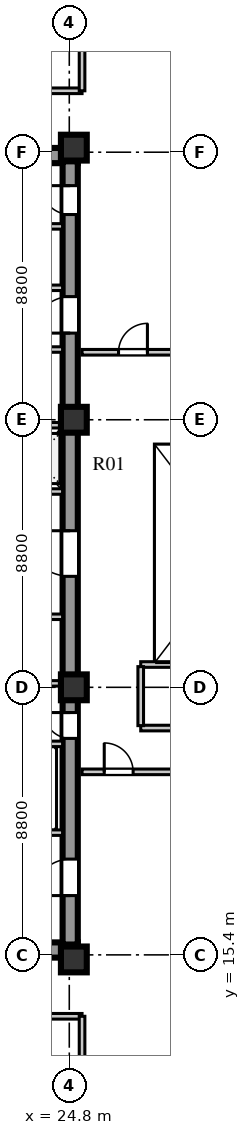
"""IFC4 building model, lengths in metres.
Left out: names, types, materials, properties, quantities, classifications, styles, units other than length and angle.
Written with IfcOpenShell. Run it as: python <this file> out.ifc"""

import sys

from ifc_helpers import new_model, si_unit, direction, frame, frame_2d, origin, origin_2d, place, context, subcontext, project, spatial, rectangle, extrude, element, fill, save


model = new_model("IFC4")
c1 = context("Model", 3, precision=1e-05, world=origin(), true_north=direction((0.0, 1.0)))
c2 = subcontext(c1, "Body", "Model", "MODEL_VIEW")
j1 = project(units=[si_unit("LENGTHUNIT", "METRE"), si_unit("PLANEANGLEUNIT", "RADIAN")], contexts=[c1])
p1 = place(None, origin())
s1 = spatial("IfcSite", under=j1, at=p1, CompositionType="ELEMENT")
p2 = place(p1, origin())
s2 = spatial("IfcBuilding", under=s1, at=p2, CompositionType="ELEMENT")
p3 = place(p2, frame((0.0, 0.0, 150.2)))
s3 = spatial("IfcBuildingStorey", under=s2, at=p3, CompositionType="ELEMENT", Elevation=150.2)
for number, where, z_axis, x_axis in (
    (1, (15.4, 15.56, 0.0), (0.0, 0.0, 1.0), (1.0, 0.0, 0.0)),
    (2, (15.4, 41.69, 0.0), (0.0, 0.0, 1.0), (1.0, 0.0, 0.0)),
):
    element("IfcWall", number, at=place(p3, frame(where, z_axis=z_axis, x_axis=x_axis)), inside=s3, PredefinedType="SHEAR", context=c2, shape_type="SweptSolid", body=[
        extrude(rectangle(XDim=9.68, YDim=0.5, at=frame_2d((4.84, 0.0))), origin(), (0.0, 0.0, 1.0), 3.55),
    ])
p4 = place(p3, frame((24.83, 15.74, 0.0), z_axis=(0.0, 0.0, 1.0), x_axis=(0.0, 1.0, 0.0)))
e3 = element("IfcWall", 3, at=p4, inside=s3, PredefinedType="SHEAR", context=c2, shape_type="SweptSolid", body=[
    extrude(rectangle(XDim=25.76, YDim=0.5, at=frame_2d((12.88, 0.0))), origin(), (0.0, 0.0, 1.0), 3.55),
])
p5 = place(p4, frame((1.61, 0.0, 0.0)))
e4 = element("IfcOpeningElement", 4, at=p5, cuts=e3, PredefinedType="OPENING", context=c2, shape_type="SweptSolid", body=[
    extrude(rectangle(XDim=1.2, YDim=2.1, at=frame_2d((0.6, 1.05))), frame((0.0, 0.26, 0.0), z_axis=(0.0, -1.0, 0.0), x_axis=(1.0, 0.0, 0.0)), (0.0, 0.0, 1.0), 0.52),
])
p6 = place(p4, frame((6.78, 0.0, 0.0)))
e5 = element("IfcOpeningElement", 5, at=p6, cuts=e3, PredefinedType="OPENING", context=c2, shape_type="SweptSolid", body=[
    extrude(rectangle(XDim=0.85, YDim=2.06, at=frame_2d((0.425, 1.03))), frame((0.0, 0.26, 0.0), z_axis=(0.0, -1.0, 0.0), x_axis=(1.0, 0.0, 0.0)), (0.0, 0.0, 1.0), 0.52),
])
p7 = place(p4, frame((12.11, 0.0, 0.0)))
e6 = element("IfcOpeningElement", 6, at=p7, cuts=e3, PredefinedType="OPENING", context=c2, shape_type="SweptSolid", body=[
    extrude(rectangle(XDim=1.5, YDim=2.12, at=frame_2d((0.75, 1.06))), frame((0.0, 0.26, 0.0), z_axis=(0.0, -1.0, 0.0), x_axis=(1.0, 0.0, 0.0)), (0.0, 0.0, 1.0), 0.52),
])
p8 = place(p4, frame((20.11, 0.0, 0.0)))
e7 = element("IfcOpeningElement", 7, at=p8, cuts=e3, PredefinedType="OPENING", context=c2, shape_type="SweptSolid", body=[
    extrude(rectangle(XDim=1.2, YDim=2.12, at=frame_2d((0.6, 1.06))), frame((0.0, 0.26, 0.0), z_axis=(0.0, -1.0, 0.0), x_axis=(1.0, 0.0, 0.0)), (0.0, 0.0, 1.0), 0.52),
])
p9 = place(p4, frame((24.01, 0.0, 0.0)))
e8 = element("IfcOpeningElement", 8, at=p9, cuts=e3, PredefinedType="OPENING", context=c2, shape_type="SweptSolid", body=[
    extrude(rectangle(XDim=0.95, YDim=2.1, at=frame_2d((0.475, 1.05))), frame((0.0, 0.26, 0.0), z_axis=(0.0, -1.0, 0.0), x_axis=(1.0, 0.0, 0.0)), (0.0, 0.0, 1.0), 0.52),
])
for number, where, z_axis, x_axis in (
    (9, (24.95, 15.25, 0.0), (0.0, 0.0, 1.0), (1.0, 0.0, 0.0)),
    (10, (24.95, 24.2, 0.0), (0.0, 0.0, 1.0), (1.0, 0.0, 0.0)),
    (11, (24.95, 33.0, 0.0), (0.0, 0.0, 1.0), (1.0, 0.0, 0.0)),
    (12, (24.95, 41.95, 0.0), (0.0, 0.0, 1.0), (1.0, 0.0, 0.0)),
):
    element("IfcColumn", number, at=place(p3, frame(where, z_axis=z_axis, x_axis=x_axis)), inside=s3, PredefinedType="COLUMN", context=c2, shape_type="SweptSolid", body=[
        extrude(rectangle(XDim=0.85, YDim=0.85, at=origin_2d()), origin(), (0.0, 0.0, 1.0), 3.55),
    ])
p10 = place(p3, frame((19.64, 19.42, 0.0), z_axis=(0.0, 0.0, 1.0), x_axis=(1.0, 0.0, 0.0)))
e13 = element("IfcWall", 13, at=p10, inside=s3, PredefinedType="SOLIDWALL", context=c2, shape_type="SweptSolid", body=[
    extrude(rectangle(XDim=4.94, YDim=0.18, at=frame_2d((2.47, 0.0))), origin(), (0.0, 0.0, 1.0), 3.55),
])
p11 = place(p10, frame((0.72, 0.0, 0.0)))
e14 = element("IfcOpeningElement", 14, at=p11, cuts=e13, PredefinedType="OPENING", context=c2, shape_type="SweptSolid", body=[
    extrude(rectangle(XDim=1.1, YDim=2.1, at=frame_2d((0.55, 1.05))), frame((0.0, 0.1, 0.0), z_axis=(0.0, -1.0, 0.0), x_axis=(1.0, 0.0, 0.0)), (0.0, 0.0, 1.0), 0.2),
])
p12 = place(p10, frame((3.02, 0.0, 0.0)))
e15 = element("IfcOpeningElement", 15, at=p12, cuts=e13, PredefinedType="OPENING", context=c2, shape_type="SweptSolid", body=[
    extrude(rectangle(XDim=1.1, YDim=2.1, at=frame_2d((0.55, 1.05))), frame((0.0, 0.1, 0.0), z_axis=(0.0, -1.0, 0.0), x_axis=(1.0, 0.0, 0.0)), (0.0, 0.0, 1.0), 0.2),
])
p13 = place(p3, frame((19.64, 22.34, 0.0), z_axis=(0.0, 0.0, 1.0), x_axis=(1.0, 0.0, 0.0)))
e16 = element("IfcWall", 16, at=p13, inside=s3, PredefinedType="SOLIDWALL", context=c2, shape_type="SweptSolid", body=[
    extrude(rectangle(XDim=4.94, YDim=0.18, at=frame_2d((2.47, 0.0))), origin(), (0.0, 0.0, 1.0), 3.55),
])
p14 = place(p3, frame((15.9, 26.52, 0.0), z_axis=(0.0, 0.0, 1.0), x_axis=(1.0, 0.0, 0.0)))
e17 = element("IfcWall", 17, at=p14, inside=s3, PredefinedType="SOLIDWALL", context=c2, shape_type="SweptSolid", body=[
    extrude(rectangle(XDim=8.68, YDim=0.18, at=frame_2d((4.34, 0.0))), origin(), (0.0, 0.0, 1.0), 3.55),
])
p15 = place(p14, frame((3.3, 0.0, 0.0)))
e18 = element("IfcOpeningElement", 18, at=p15, cuts=e17, PredefinedType="OPENING", context=c2, shape_type="SweptSolid", body=[
    extrude(rectangle(XDim=0.95, YDim=2.1, at=frame_2d((0.475, 1.05))), frame((0.0, 0.1, 0.0), z_axis=(0.0, -1.0, 0.0), x_axis=(1.0, 0.0, 0.0)), (0.0, 0.0, 1.0), 0.2),
])
p16 = place(p3, frame((15.9, 24.33, 0.0), z_axis=(0.0, 0.0, 1.0), x_axis=(1.0, 0.0, 0.0)))
e19 = element("IfcWall", 19, at=p16, inside=s3, PredefinedType="SOLIDWALL", context=c2, shape_type="SweptSolid", body=[
    extrude(rectangle(XDim=8.68, YDim=0.18, at=frame_2d((4.34, 0.0))), origin(), (0.0, 0.0, 1.0), 2.9),
])
p17 = place(p3, frame((15.9, 30.64, 0.0), z_axis=(0.0, 0.0, 1.0), x_axis=(1.0, 0.0, 0.0)))
e20 = element("IfcWall", 20, at=p17, inside=s3, PredefinedType="SOLIDWALL", context=c2, shape_type="SweptSolid", body=[
    extrude(rectangle(XDim=8.68, YDim=0.18, at=frame_2d((4.34, 0.0))), origin(), (0.0, 0.0, 1.0), 3.55),
])
p18 = place(p17, frame((1.76, 0.0, 0.0)))
e21 = element("IfcOpeningElement", 21, at=p18, cuts=e20, PredefinedType="OPENING", context=c2, shape_type="SweptSolid", body=[
    extrude(rectangle(XDim=1.0, YDim=2.1, at=frame_2d((0.5, 1.05))), frame((0.0, 0.1, 0.0), z_axis=(0.0, -1.0, 0.0), x_axis=(1.0, 0.0, 0.0)), (0.0, 0.0, 1.0), 0.2),
])
p19 = place(p17, frame((3.6, 0.0, 0.0)))
e22 = element("IfcOpeningElement", 22, at=p19, cuts=e20, PredefinedType="OPENING", context=c2, shape_type="SweptSolid", body=[
    extrude(rectangle(XDim=1.0, YDim=2.1, at=frame_2d((0.5, 1.05))), frame((0.0, 0.1, 0.0), z_axis=(0.0, -1.0, 0.0), x_axis=(1.0, 0.0, 0.0)), (0.0, 0.0, 1.0), 0.2),
])
p20 = place(p17, frame((5.44, 0.0, 0.0)))
e23 = element("IfcOpeningElement", 23, at=p20, cuts=e20, PredefinedType="OPENING", context=c2, shape_type="SweptSolid", body=[
    extrude(rectangle(XDim=1.0, YDim=2.1, at=frame_2d((0.5, 1.05))), frame((0.0, 0.1, 0.0), z_axis=(0.0, -1.0, 0.0), x_axis=(1.0, 0.0, 0.0)), (0.0, 0.0, 1.0), 0.2),
])
p21 = place(p17, frame((7.28, 0.0, 0.0)))
e24 = element("IfcOpeningElement", 24, at=p21, cuts=e20, PredefinedType="OPENING", context=c2, shape_type="SweptSolid", body=[
    extrude(rectangle(XDim=1.0, YDim=2.1, at=frame_2d((0.5, 1.05))), frame((0.0, 0.1, 0.0), z_axis=(0.0, -1.0, 0.0), x_axis=(1.0, 0.0, 0.0)), (0.0, 0.0, 1.0), 0.2),
])
p22 = place(p3, frame((15.9, 32.82, 0.0), z_axis=(0.0, 0.0, 1.0), x_axis=(1.0, 0.0, 0.0)))
e25 = element("IfcWall", 25, at=p22, inside=s3, PredefinedType="SOLIDWALL", context=c2, shape_type="SweptSolid", body=[
    extrude(rectangle(XDim=8.68, YDim=0.18, at=frame_2d((4.34, 0.0))), origin(), (0.0, 0.0, 1.0), 2.9),
])
p23 = place(p3, frame((22.02, 35.31, 0.0), z_axis=(0.0, 0.0, 1.0), x_axis=(1.0, 0.0, 0.0)))
e26 = element("IfcWall", 26, at=p23, inside=s3, PredefinedType="SOLIDWALL", context=c2, shape_type="SweptSolid", body=[
    extrude(rectangle(XDim=2.56, YDim=0.18, at=frame_2d((1.28, 0.0))), origin(), (0.0, 0.0, 1.0), 3.55),
])
p24 = place(p23, frame((0.55, 0.0, 0.0)))
e27 = element("IfcOpeningElement", 27, at=p24, cuts=e26, PredefinedType="OPENING", context=c2, shape_type="SweptSolid", body=[
    extrude(rectangle(XDim=1.0, YDim=2.1, at=frame_2d((0.5, 1.05))), frame((0.0, 0.1, 0.0), z_axis=(0.0, -1.0, 0.0), x_axis=(1.0, 0.0, 0.0)), (0.0, 0.0, 1.0), 0.2),
])
p25 = place(p3, frame((19.64, 37.34, 0.0), z_axis=(0.0, 0.0, 1.0), x_axis=(1.0, 0.0, 0.0)))
e28 = element("IfcWall", 28, at=p25, inside=s3, PredefinedType="SOLIDWALL", context=c2, shape_type="SweptSolid", body=[
    extrude(rectangle(XDim=4.94, YDim=0.18, at=frame_2d((2.47, 0.0))), origin(), (0.0, 0.0, 1.0), 3.55),
])
p26 = place(p25, frame((0.45, 0.0, 0.0)))
e29 = element("IfcOpeningElement", 29, at=p26, cuts=e28, PredefinedType="OPENING", context=c2, shape_type="SweptSolid", body=[
    extrude(rectangle(XDim=1.0, YDim=2.1, at=frame_2d((0.5, 1.05))), frame((0.0, 0.1, 0.0), z_axis=(0.0, -1.0, 0.0), x_axis=(1.0, 0.0, 0.0)), (0.0, 0.0, 1.0), 0.2),
])
p27 = place(p25, frame((2.5, 0.0, 0.0)))
e30 = element("IfcOpeningElement", 30, at=p27, cuts=e28, PredefinedType="OPENING", context=c2, shape_type="SweptSolid", body=[
    extrude(rectangle(XDim=1.0, YDim=2.1, at=frame_2d((0.5, 1.05))), frame((0.0, 0.1, 0.0), z_axis=(0.0, -1.0, 0.0), x_axis=(1.0, 0.0, 0.0)), (0.0, 0.0, 1.0), 0.2),
])
p28 = place(p3, frame((19.64, 39.36, 0.0), z_axis=(0.0, 0.0, 1.0), x_axis=(1.0, 0.0, 0.0)))
e31 = element("IfcWall", 31, at=p28, inside=s3, PredefinedType="SOLIDWALL", context=c2, shape_type="SweptSolid", body=[
    extrude(rectangle(XDim=4.94, YDim=0.18, at=frame_2d((2.47, 0.0))), origin(), (0.0, 0.0, 1.0), 3.55),
])
p29 = place(p3, frame((25.22, 21.42, 0.0), z_axis=(0.0, 0.0, 1.0), x_axis=(1.0, 0.0, 0.0)))
e32 = element("IfcWall", 32, at=p29, inside=s3, PredefinedType="SOLIDWALL", context=c2, shape_type="SweptSolid", body=[
    extrude(rectangle(XDim=15.6, YDim=0.185, at=frame_2d((7.8, 0.0))), origin(), (0.0, 0.0, 1.0), 3.15),
])
p30 = place(p29, frame((0.73, 0.0, 0.0)))
e33 = element("IfcOpeningElement", 33, at=p30, cuts=e32, PredefinedType="OPENING", context=c2, shape_type="SweptSolid", body=[
    extrude(rectangle(XDim=0.95, YDim=2.1, at=frame_2d((0.475, 1.05))), frame((0.0, 0.103, 0.0), z_axis=(0.0, -1.0, 0.0), x_axis=(1.0, 0.0, 0.0)), (0.0, 0.0, 1.0), 0.205),
])
p31 = place(p3, frame((27.15, 22.86, 0.0), z_axis=(0.0, 0.0, 1.0), x_axis=(1.0, 0.0, 0.0)))
e34 = element("IfcWall", 34, at=p31, inside=s3, PredefinedType="SOLIDWALL", context=c2, shape_type="SweptSolid", body=[
    extrude(rectangle(XDim=13.67, YDim=0.185, at=frame_2d((6.835, 0.0))), origin(), (0.0, 0.0, 1.0), 3.55),
])
p32 = place(p31, frame((2.2, 0.0, 0.0)))
e35 = element("IfcOpeningElement", 35, at=p32, cuts=e34, PredefinedType="OPENING", context=c2, shape_type="SweptSolid", body=[
    extrude(rectangle(XDim=0.9, YDim=2.08, at=frame_2d((0.45, 1.04))), frame((0.0, 0.103, 0.0), z_axis=(0.0, -1.0, 0.0), x_axis=(1.0, 0.0, 0.0)), (0.0, 0.0, 1.0), 0.205),
])
p33 = place(p3, frame((25.22, 35.22, 0.0), z_axis=(0.0, 0.0, 1.0), x_axis=(1.0, 0.0, 0.0)))
e36 = element("IfcWall", 36, at=p33, inside=s3, PredefinedType="SOLIDWALL", context=c2, shape_type="SweptSolid", body=[
    extrude(rectangle(XDim=9.5, YDim=0.185, at=frame_2d((4.75, 0.0))), origin(), (0.0, 0.0, 1.0), 3.55),
])
p34 = place(p33, frame((1.2, 0.0, 0.0)))
e37 = element("IfcOpeningElement", 37, at=p34, cuts=e36, PredefinedType="OPENING", context=c2, shape_type="SweptSolid", body=[
    extrude(rectangle(XDim=0.95, YDim=2.1, at=frame_2d((0.475, 1.05))), frame((0.0, 0.103, 0.0), z_axis=(0.0, -1.0, 0.0), x_axis=(1.0, 0.0, 0.0)), (0.0, 0.0, 1.0), 0.205),
])
p35 = place(p3, frame((13.59, 13.38, 0.0), z_axis=(0.0, 0.0, 1.0), x_axis=(1.0, 0.0, 0.0)))
e38 = element("IfcWall", 38, at=p35, inside=s3, PredefinedType="SOLIDWALL", context=c2, shape_type="SweptSolid", body=[
    extrude(rectangle(XDim=11.63, YDim=0.185, at=frame_2d((5.815, 0.0))), origin(), (0.0, 0.0, 1.0), 3.55),
])
p36 = place(p35, frame((4.56, 0.0, 0.0)))
e39 = element("IfcOpeningElement", 39, at=p36, cuts=e38, PredefinedType="OPENING", context=c2, shape_type="SweptSolid", body=[
    extrude(rectangle(XDim=1.0, YDim=2.08, at=frame_2d((0.5, 1.04))), frame((0.0, 0.103, 0.0), z_axis=(0.0, -1.0, 0.0), x_axis=(1.0, 0.0, 0.0)), (0.0, 0.0, 1.0), 0.205),
])
p37 = place(p3, frame((25.22, 10.28, 0.0), z_axis=(0.0, 0.0, 1.0), x_axis=(0.0, 1.0, 0.0)))
e40 = element("IfcWall", 40, at=p37, inside=s3, PredefinedType="SOLIDWALL", context=c2, shape_type="SweptSolid", body=[
    extrude(rectangle(XDim=3.1, YDim=0.185, at=frame_2d((1.55, 0.0))), origin(), (0.0, 0.0, 1.0), 3.05),
])
p38 = place(p3, frame((13.59, 43.82, 0.0), z_axis=(0.0, 0.0, 1.0), x_axis=(1.0, 0.0, 0.0)))
e41 = element("IfcWall", 41, at=p38, inside=s3, PredefinedType="SOLIDWALL", context=c2, shape_type="SweptSolid", body=[
    extrude(rectangle(XDim=11.63, YDim=0.185, at=frame_2d((5.815, 0.0))), origin(), (0.0, 0.0, 1.0), 3.55),
])
p39 = place(p38, frame((4.56, 0.0, 0.0)))
e42 = element("IfcOpeningElement", 42, at=p39, cuts=e41, PredefinedType="OPENING", context=c2, shape_type="SweptSolid", body=[
    extrude(rectangle(XDim=1.0, YDim=2.08, at=frame_2d((0.5, 1.04))), frame((0.0, 0.103, 0.0), z_axis=(0.0, -1.0, 0.0), x_axis=(1.0, 0.0, 0.0)), (0.0, 0.0, 1.0), 0.205),
])
p40 = place(p3, frame((25.22, 43.82, 0.0), z_axis=(0.0, 0.0, 1.0), x_axis=(0.0, 1.0, 0.0)))
e43 = element("IfcWall", 43, at=p40, inside=s3, PredefinedType="SOLIDWALL", context=c2, shape_type="SweptSolid", body=[
    extrude(rectangle(XDim=3.1, YDim=0.185, at=frame_2d((1.55, 0.0))), origin(), (0.0, 0.0, 1.0), 3.05),
])
p41 = place(p3, frame((27.15, 24.95, 0.0), z_axis=(0.0, 0.0, 1.0), x_axis=(1.0, 0.0, 0.0)))
e44 = element("IfcWall", 44, at=p41, inside=s3, PredefinedType="SOLIDWALL", context=c2, shape_type="SweptSolid", body=[
    extrude(rectangle(XDim=9.67, YDim=0.185, at=frame_2d((4.835, 0.0))), origin(), (0.0, 0.0, 1.0), 3.0),
])
p42 = place(p3, frame((27.15, 22.94, 0.0), z_axis=(0.0, 0.0, 1.0), x_axis=(0.0, 1.0, 0.0)))
e45 = element("IfcWall", 45, at=p42, inside=s3, PredefinedType="SOLIDWALL", context=c2, shape_type="SweptSolid", body=[
    extrude(rectangle(XDim=1.94, YDim=0.185, at=frame_2d((0.97, 0.0))), origin(), (0.0, 0.0, 1.0), 3.55),
])
p43 = place(p5, frame((1.2, 0.0, 0.0), z_axis=(0.0, 0.0, 1.0), x_axis=(-1.0, 0.0, 0.0)))
e46 = element("IfcDoor", 46, at=p43, inside=s3, OperationType="SINGLE_SWING_RIGHT", PredefinedType="DOOR", context=c2, shape_type="SweptSolid", body=[
    extrude(rectangle(XDim=1.2, YDim=2.1, at=frame_2d((0.6, 1.05))), frame((0.0, 0.025, 0.0), z_axis=(0.0, -1.0, 0.0), x_axis=(1.0, 0.0, 0.0)), (0.0, 0.0, 1.0), 0.05),
])
fill(e4, e46)
p44 = place(p6, frame((0.85, 0.0, 0.0), z_axis=(0.0, 0.0, 1.0), x_axis=(-1.0, 0.0, 0.0)))
e47 = element("IfcDoor", 47, at=p44, inside=s3, OperationType="SINGLE_SWING_LEFT", PredefinedType="DOOR", context=c2, shape_type="SweptSolid", body=[
    extrude(rectangle(XDim=0.85, YDim=2.06, at=frame_2d((0.425, 1.03))), frame((0.0, 0.025, 0.0), z_axis=(0.0, -1.0, 0.0), x_axis=(1.0, 0.0, 0.0)), (0.0, 0.0, 1.0), 0.05),
])
fill(e5, e47)
p45 = place(p7, frame((1.5, 0.0, 0.0), z_axis=(0.0, 0.0, 1.0), x_axis=(-1.0, 0.0, 0.0)))
e48 = element("IfcDoor", 48, at=p45, inside=s3, OperationType="SINGLE_SWING_LEFT", PredefinedType="DOOR", context=c2, shape_type="SweptSolid", body=[
    extrude(rectangle(XDim=1.5, YDim=2.12, at=frame_2d((0.75, 1.06))), frame((0.0, 0.025, 0.0), z_axis=(0.0, -1.0, 0.0), x_axis=(1.0, 0.0, 0.0)), (0.0, 0.0, 1.0), 0.05),
])
fill(e6, e48)
p46 = place(p8, frame((1.2, 0.0, 0.0), z_axis=(0.0, 0.0, 1.0), x_axis=(-1.0, 0.0, 0.0)))
e49 = element("IfcDoor", 49, at=p46, inside=s3, OperationType="SINGLE_SWING_RIGHT", PredefinedType="DOOR", context=c2, shape_type="SweptSolid", body=[
    extrude(rectangle(XDim=1.2, YDim=2.12, at=frame_2d((0.6, 1.06))), frame((0.0, 0.025, 0.0), z_axis=(0.0, -1.0, 0.0), x_axis=(1.0, 0.0, 0.0)), (0.0, 0.0, 1.0), 0.05),
])
fill(e7, e49)
p47 = place(p9, frame((0.95, 0.0, 0.0), z_axis=(0.0, 0.0, 1.0), x_axis=(-1.0, 0.0, 0.0)))
e50 = element("IfcDoor", 50, at=p47, inside=s3, OperationType="SINGLE_SWING_LEFT", PredefinedType="DOOR", context=c2, shape_type="SweptSolid", body=[
    extrude(rectangle(XDim=0.95, YDim=2.1, at=frame_2d((0.475, 1.05))), frame((0.0, 0.025, 0.0), z_axis=(0.0, -1.0, 0.0), x_axis=(1.0, 0.0, 0.0)), (0.0, 0.0, 1.0), 0.05),
])
fill(e8, e50)
p48 = place(p30, frame((0.95, 0.0, 0.0), z_axis=(0.0, 0.0, 1.0), x_axis=(-1.0, 0.0, 0.0)))
e51 = element("IfcDoor", 51, at=p48, inside=s3, OperationType="SINGLE_SWING_RIGHT", PredefinedType="DOOR", context=c2, shape_type="SweptSolid", body=[
    extrude(rectangle(XDim=0.95, YDim=2.1, at=frame_2d((0.475, 1.05))), frame((0.0, 0.025, 0.0), z_axis=(0.0, -1.0, 0.0), x_axis=(1.0, 0.0, 0.0)), (0.0, 0.0, 1.0), 0.05),
])
fill(e33, e51)
p49 = place(p34, origin())
e52 = element("IfcDoor", 52, at=p49, inside=s3, OperationType="SINGLE_SWING_RIGHT", PredefinedType="DOOR", context=c2, shape_type="SweptSolid", body=[
    extrude(rectangle(XDim=0.95, YDim=2.1, at=frame_2d((0.475, 1.05))), frame((0.0, 0.025, 0.0), z_axis=(0.0, -1.0, 0.0), x_axis=(1.0, 0.0, 0.0)), (0.0, 0.0, 1.0), 0.05),
])
fill(e37, e52)
save(model, sys.argv[1])
